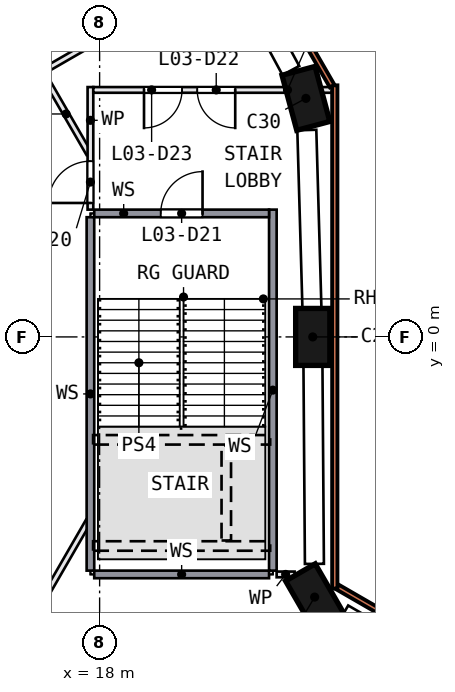
"""IFC4 building model, lengths in metres.
Left out: names, types, materials, properties, quantities, classifications, styles, units other than length and angle.
Written with IfcOpenShell. Run it as: python <this file> out.ifc"""

import sys

from ifc_helpers import new_model, si_unit, direction, frame, frame_2d, origin, origin_2d, place, context, subcontext, project, spatial, rectangle, extrude, element, fill, save


model = new_model("IFC4")
c1 = context("Model", 3, precision=1e-05, world=origin(), true_north=direction((0.0, 1.0)))
c2 = subcontext(c1, "Body", "Model", "MODEL_VIEW")
j1 = project(units=[si_unit("LENGTHUNIT", "METRE"), si_unit("PLANEANGLEUNIT", "RADIAN")], contexts=[c1])
p1 = place(None, origin())
s1 = spatial("IfcSite", under=j1, at=p1, CompositionType="ELEMENT")
p2 = place(p1, origin())
s2 = spatial("IfcBuilding", under=s1, at=p2, CompositionType="ELEMENT")
p3 = place(p2, frame((0.0, 0.0, 19.0)))
s3 = spatial("IfcBuildingStorey", under=s2, at=p3, CompositionType="ELEMENT", Elevation=19.0)
for number, where, z_axis, x_axis in (
    (1, (23.658, -6.846, 0.0), (0.0, 0.0, 1.0), (0.5, -0.866, 0.0)),
    (2, (23.608, 0.0, 0.0), (0.0, 0.0, 1.0), (0.0, 1.0, 0.0)),
    (3, (23.428, 6.278, 0.0), (0.0, 0.0, 1.0), (0.259, -0.966, 0.0)),
):
    element("IfcColumn", number, at=place(p3, frame(where, z_axis=z_axis, x_axis=x_axis)), inside=s3, PredefinedType="COLUMN", context=c2, shape_type="SweptSolid", body=[
        extrude(rectangle(XDim=1.5, YDim=0.9, at=origin_2d()), origin(), (0.0, 0.0, 1.0), 4.05),
    ])
p4 = place(p3, frame((33.751, -12.062, 0.0), z_axis=(0.0, 0.0, 1.0), x_axis=(-0.86602647, 0.499998154, 0.0)))
e4 = element("IfcWall", 4, at=p4, inside=s3, PredefinedType="SOLIDWALL", context=c2, shape_type="SweptSolid", body=[
    extrude(rectangle(XDim=10.961, YDim=0.14, at=frame_2d((5.481, 0.0))), origin(), (0.0, 0.0, 1.0), 4.05),
])
p5 = place(p4, frame((6.702, 0.0, 0.9)))
e5 = element("IfcOpeningElement", 5, at=p5, cuts=e4, PredefinedType="OPENING", context=c2, shape_type="SweptSolid", body=[
    extrude(rectangle(XDim=3.0, YDim=2.4, at=frame_2d((1.5, 1.2))), frame((0.0, 0.08, 0.0), z_axis=(0.0, -1.0, 0.0), x_axis=(1.0, 0.0, 0.0)), (0.0, 0.0, 1.0), 0.16),
])
p6 = place(p3, frame((24.188, -6.621, 0.0), z_axis=(0.0, 0.0, 1.0), x_axis=(0.0, 1.0, 0.0)))
e6 = element("IfcWall", 6, at=p6, inside=s3, PredefinedType="SOLIDWALL", context=c2, shape_type="SweptSolid", body=[
    extrude(rectangle(XDim=13.242, YDim=0.14, at=frame_2d((6.621, 0.0))), origin(), (0.0, 0.0, 1.0), 4.05),
])
p7 = place(p3, frame((24.118, 6.603, 0.0), z_axis=(0.0, 0.0, 1.0), x_axis=(-0.499997984, 0.866026568, 0.0)))
e7 = element("IfcWall", 7, at=p7, inside=s3, PredefinedType="SOLIDWALL", context=c2, shape_type="SweptSolid", body=[
    extrude(rectangle(XDim=12.962, YDim=0.14, at=frame_2d((6.481, 0.0))), origin(), (0.0, 0.0, 1.0), 4.05),
])
p8 = place(p3, frame((16.517, 6.909, 0.0), z_axis=(0.0, 0.0, 1.0), x_axis=(0.499933044, -0.866064057, 0.0)))
e8 = element("IfcWall", 8, at=p8, inside=s3, PredefinedType="PARTITIONING", context=c2, shape_type="SweptSolid", body=[
    extrude(rectangle(XDim=2.408, YDim=0.15, at=frame_2d((1.204, 0.0))), origin(), (0.0, 0.0, 1.0), 4.05),
])
p9 = place(p3, frame((17.858, -6.25, 0.0), z_axis=(0.0, 0.0, 1.0), x_axis=(1.0, 0.0, 0.0)))
e9 = element("IfcWall", 9, at=p9, inside=s3, PredefinedType="SOLIDWALL", context=c2, shape_type="SweptSolid", body=[
    extrude(rectangle(XDim=4.6, YDim=0.2, at=frame_2d((2.3, 0.0))), origin(), (0.0, 0.0, 1.0), 4.05),
])
p10 = place(p3, frame((12.117, -14.53, 0.0), z_axis=(0.0, 0.0, 1.0), x_axis=(0.500001509, 0.866024532, 0.0)))
e10 = element("IfcWall", 10, at=p10, inside=s3, PredefinedType="PARTITIONING", context=c2, shape_type="SweptSolid", body=[
    extrude(rectangle(XDim=11.183, YDim=0.15, at=frame_2d((5.592, 0.0))), origin(), (0.0, 0.0, 1.0), 4.05),
])
p11 = place(p10, frame((5.433, 0.0, 0.0)))
e11 = element("IfcOpeningElement", 11, at=p11, cuts=e10, PredefinedType="OPENING", context=c2, shape_type="SweptSolid", body=[
    extrude(rectangle(XDim=1.8, YDim=2.1, at=frame_2d((0.9, 1.05))), frame((0.0, 0.085, 0.0), z_axis=(0.0, -1.0, 0.0), x_axis=(1.0, 0.0, 0.0)), (0.0, 0.0, 1.0), 0.17),
])
p12 = place(p3, frame((17.758, 3.15, 0.0), z_axis=(0.0, 0.0, 1.0), x_axis=(0.0, -1.0, 0.0)))
e12 = element("IfcWall", 12, at=p12, inside=s3, PredefinedType="SOLIDWALL", context=c2, shape_type="SweptSolid", body=[
    extrude(rectangle(XDim=9.3, YDim=0.2, at=frame_2d((4.65, 0.0))), origin(), (0.0, 0.0, 1.0), 4.05),
])
p13 = place(p3, frame((17.758, 3.35, 0.0), z_axis=(0.0, 0.0, 1.0), x_axis=(0.0, 1.0, 0.0)))
e13 = element("IfcWall", 13, at=p13, inside=s3, PredefinedType="PARTITIONING", context=c2, shape_type="SweptSolid", body=[
    extrude(rectangle(XDim=3.225, YDim=0.15, at=frame_2d((1.613, 0.0))), origin(), (0.0, 0.0, 1.0), 4.05),
])
p14 = place(p13, frame((0.175, 0.0, 0.0)))
e14 = element("IfcOpeningElement", 14, at=p14, cuts=e13, PredefinedType="OPENING", context=c2, shape_type="SweptSolid", body=[
    extrude(rectangle(XDim=1.1, YDim=2.1, at=frame_2d((0.55, 1.05))), frame((0.0, 0.085, 0.0), z_axis=(0.0, -1.0, 0.0), x_axis=(1.0, 0.0, 0.0)), (0.0, 0.0, 1.0), 0.17),
])
p15 = place(p3, frame((21.987, 10.154, 0.0), z_axis=(0.0, 0.0, 1.0), x_axis=(-0.866032921, -0.49998698, 0.0)))
e15 = element("IfcWall", 15, at=p15, inside=s3, PredefinedType="PARTITIONING", context=c2, shape_type="SweptSolid", body=[
    extrude(rectangle(XDim=6.285, YDim=0.15, at=frame_2d((3.143, 0.0))), origin(), (0.0, 0.0, 1.0), 4.05),
])
p16 = place(p3, frame((22.558, -6.15, 0.0), z_axis=(0.0, 0.0, 1.0), x_axis=(0.0, 1.0, 0.0)))
e16 = element("IfcWall", 16, at=p16, inside=s3, PredefinedType="SOLIDWALL", context=c2, shape_type="SweptSolid", body=[
    extrude(rectangle(XDim=9.5, YDim=0.2, at=frame_2d((4.75, 0.0))), origin(), (0.0, 0.0, 1.0), 4.05),
])
p17 = place(p3, frame((22.658, -6.25, 0.0), z_axis=(0.0, 0.0, 1.0), x_axis=(1.0, 0.0, 0.0)))
e17 = element("IfcWall", 17, at=p17, inside=s3, PredefinedType="PARTITIONING", context=c2, shape_type="SweptSolid", body=[
    extrude(rectangle(XDim=0.473, YDim=0.15, at=frame_2d((0.237, 0.0))), origin(), (0.0, 0.0, 1.0), 4.05),
])
p18 = place(p3, frame((17.858, 3.25, 0.0), z_axis=(0.0, 0.0, 1.0), x_axis=(1.0, 0.0, 0.0)))
e18 = element("IfcWall", 18, at=p18, inside=s3, PredefinedType="SOLIDWALL", context=c2, shape_type="SweptSolid", body=[
    extrude(rectangle(XDim=4.6, YDim=0.2, at=frame_2d((2.3, 0.0))), origin(), (0.0, 0.0, 1.0), 4.05),
])
p19 = place(p18, frame((1.75, 0.0, 0.0)))
e19 = element("IfcOpeningElement", 19, at=p19, cuts=e18, PredefinedType="OPENING", context=c2, shape_type="SweptSolid", body=[
    extrude(rectangle(XDim=1.1, YDim=2.1, at=frame_2d((0.55, 1.05))), frame((0.0, 0.11, 0.0), z_axis=(0.0, -1.0, 0.0), x_axis=(1.0, 0.0, 0.0)), (0.0, 0.0, 1.0), 0.22),
])
p20 = place(p3, frame((24.118, 6.5, 0.0), z_axis=(0.0, 0.0, 1.0), x_axis=(-1.0, 0.0, 0.0)))
e20 = element("IfcWall", 20, at=p20, inside=s3, PredefinedType="PARTITIONING", context=c2, shape_type="SweptSolid", body=[
    extrude(rectangle(XDim=6.285, YDim=0.15, at=frame_2d((3.143, 0.0))), origin(), (0.0, 0.0, 1.0), 4.05),
])
p21 = place(p20, frame((2.55, 0.0, 0.0)))
e21 = element("IfcOpeningElement", 21, at=p21, cuts=e20, PredefinedType="OPENING", context=c2, shape_type="SweptSolid", body=[
    extrude(rectangle(XDim=1.0, YDim=2.1, at=frame_2d((0.5, 1.05))), frame((0.0, 0.085, 0.0), z_axis=(0.0, -1.0, 0.0), x_axis=(1.0, 0.0, 0.0)), (0.0, 0.0, 1.0), 0.17),
])
p22 = place(p20, frame((3.95, 0.0, 0.0)))
e22 = element("IfcOpeningElement", 22, at=p22, cuts=e20, PredefinedType="OPENING", context=c2, shape_type="SweptSolid", body=[
    extrude(rectangle(XDim=1.0, YDim=2.1, at=frame_2d((0.5, 1.05))), frame((0.0, 0.085, 0.0), z_axis=(0.0, -1.0, 0.0), x_axis=(1.0, 0.0, 0.0)), (0.0, 0.0, 1.0), 0.17),
])
p23 = place(p14, origin())
e23 = element("IfcDoor", 23, at=p23, inside=s3, OperationType="SINGLE_SWING_LEFT", PredefinedType="DOOR", context=c2, shape_type="SweptSolid", body=[
    extrude(rectangle(XDim=1.1, YDim=2.1, at=frame_2d((0.55, 1.05))), frame((0.0, 0.025, 0.0), z_axis=(0.0, -1.0, 0.0), x_axis=(1.0, 0.0, 0.0)), (0.0, 0.0, 1.0), 0.05),
])
fill(e14, e23)
p24 = place(p19, origin())
e24 = element("IfcDoor", 24, at=p24, inside=s3, OperationType="SINGLE_SWING_RIGHT", PredefinedType="DOOR", context=c2, shape_type="SweptSolid", body=[
    extrude(rectangle(XDim=1.1, YDim=2.1, at=frame_2d((0.55, 1.05))), frame((0.0, 0.025, 0.0), z_axis=(0.0, -1.0, 0.0), x_axis=(1.0, 0.0, 0.0)), (0.0, 0.0, 1.0), 0.05),
])
fill(e19, e24)
p25 = place(p21, origin())
e25 = element("IfcDoor", 25, at=p25, inside=s3, OperationType="SINGLE_SWING_LEFT", PredefinedType="DOOR", context=c2, shape_type="SweptSolid", body=[
    extrude(rectangle(XDim=1.0, YDim=2.1, at=frame_2d((0.5, 1.05))), frame((0.0, 0.025, 0.0), z_axis=(0.0, -1.0, 0.0), x_axis=(1.0, 0.0, 0.0)), (0.0, 0.0, 1.0), 0.05),
])
fill(e21, e25)
p26 = place(p22, origin())
e26 = element("IfcDoor", 26, at=p26, inside=s3, OperationType="SINGLE_SWING_RIGHT", PredefinedType="DOOR", context=c2, shape_type="SweptSolid", body=[
    extrude(rectangle(XDim=1.0, YDim=2.1, at=frame_2d((0.5, 1.05))), frame((0.0, 0.025, 0.0), z_axis=(0.0, -1.0, 0.0), x_axis=(1.0, 0.0, 0.0)), (0.0, 0.0, 1.0), 0.05),
])
fill(e22, e26)
save(model, sys.argv[1])
